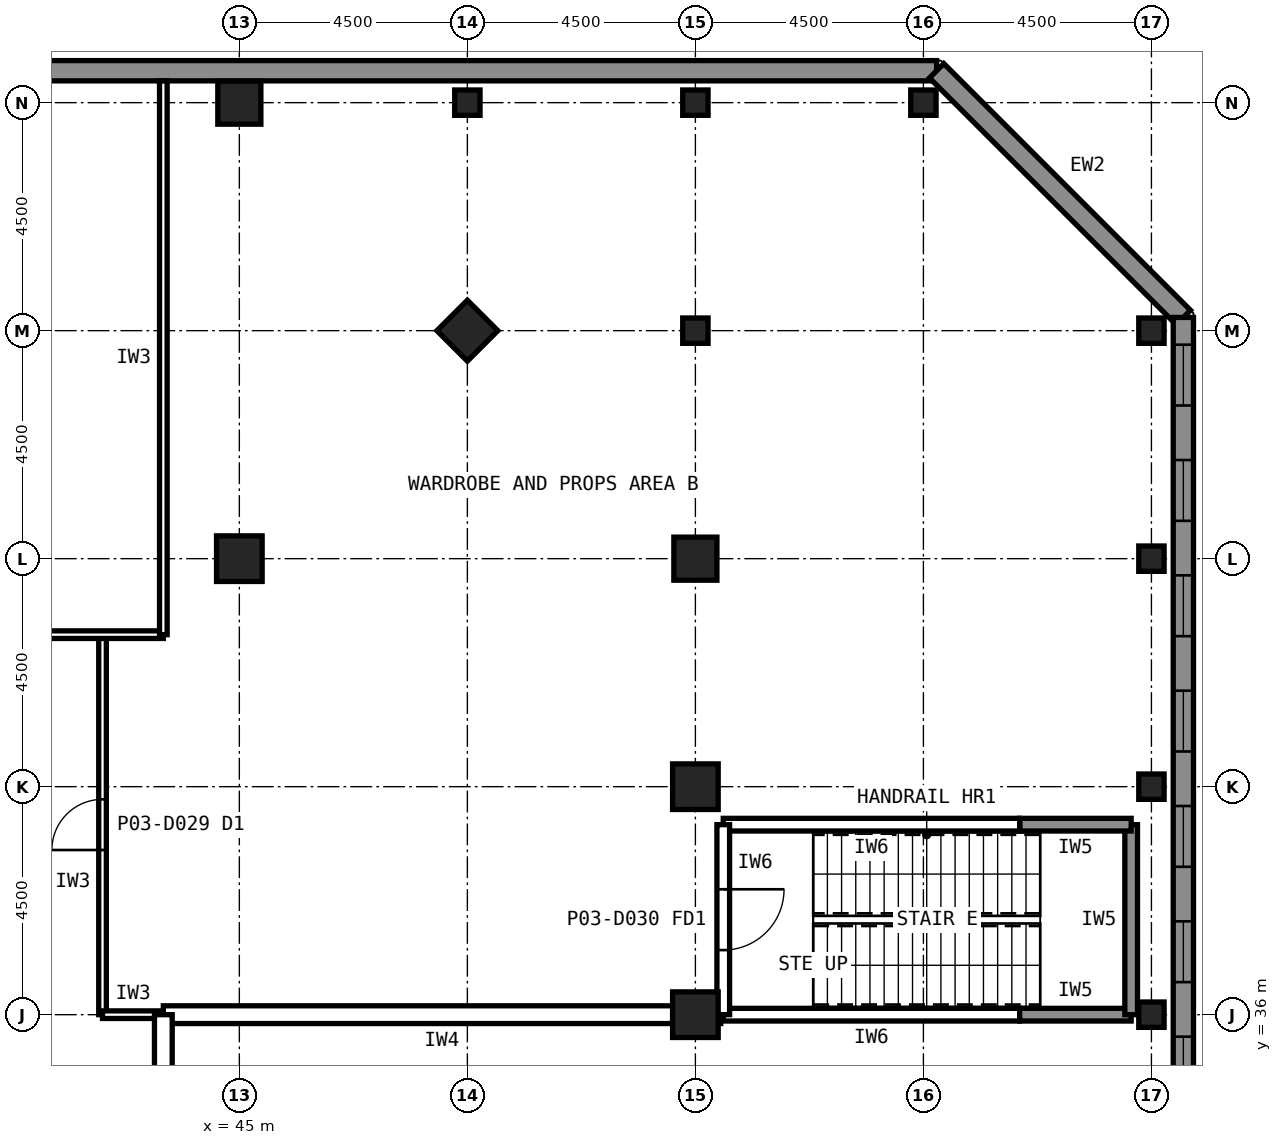
"""IFC4 building model, lengths in metres.
Left out: names, types, materials, properties, quantities, classifications, styles, units other than length and angle.
Written with IfcOpenShell. Run it as: python <this file> out.ifc"""

import sys

from ifc_helpers import new_model, si_unit, direction, frame, frame_2d, origin, origin_2d, place, context, subcontext, project, spatial, rectangle, hollow_rectangle, extrude, element, fill, save


model = new_model("IFC4")
c1 = context("Model", 3, precision=1e-05, world=origin(), true_north=direction((0.0, 1.0)))
c2 = subcontext(c1, "Body", "Model", "MODEL_VIEW")
j1 = project(units=[si_unit("LENGTHUNIT", "METRE"), si_unit("PLANEANGLEUNIT", "RADIAN")], contexts=[c1])
p1 = place(None, origin())
s1 = spatial("IfcSite", under=j1, at=p1, CompositionType="ELEMENT")
p2 = place(p1, origin())
s2 = spatial("IfcBuilding", under=s1, at=p2, CompositionType="ELEMENT")
p3 = place(p2, frame((0.0, 0.0, 12.0)))
s3 = spatial("IfcBuildingStorey", under=s2, at=p3, CompositionType="ELEMENT", Elevation=12.0)
for number, where, z_axis, x_axis in (
    (1, (54.0, 36.0, 0.0), (0.0, 0.0, 1.0), (1.0, 0.0, 0.0)),
    (2, (54.0, 40.5, 0.0), (0.0, 0.0, 1.0), (1.0, 0.0, 0.0)),
):
    element("IfcColumn", number, at=place(p3, frame(where, z_axis=z_axis, x_axis=x_axis)), inside=s3, PredefinedType="COLUMN", context=c2, shape_type="SweptSolid", body=[
        extrude(hollow_rectangle(XDim=0.9, YDim=0.9, WallThickness=0.063, at=origin_2d()), origin(), (0.0, 0.0, 1.0), 6.0),
    ])
for number, where, z_axis, x_axis in (
    (3, (54.0, 45.0, 0.0), (0.0, 0.0, 1.0), (1.0, 0.0, 0.0)),
    (4, (45.0, 54.0, 0.0), (0.0, 0.0, 1.0), (1.0, 0.0, 0.0)),
    (5, (49.5, 49.5, 0.0), (0.0, 0.0, 1.0), (0.707, 0.707, 0.0)),
):
    element("IfcColumn", number, at=place(p3, frame(where, z_axis=z_axis, x_axis=x_axis)), inside=s3, PredefinedType="COLUMN", context=c2, shape_type="SweptSolid", body=[
        extrude(hollow_rectangle(XDim=0.85, YDim=0.85, WallThickness=0.05, at=origin_2d()), origin(), (0.0, 0.0, 1.0), 6.0),
    ])
p4 = place(p3, frame((45.0, 45.0, 0.0), z_axis=(0.0, 0.0, 1.0), x_axis=(1.0, 0.0, 0.0)))
e6 = element("IfcColumn", 6, at=p4, inside=s3, PredefinedType="COLUMN", context=c2, shape_type="SweptSolid", body=[
    extrude(hollow_rectangle(XDim=0.9, YDim=0.9, WallThickness=0.063, at=origin_2d()), origin(), (0.0, 0.0, 1.0), 6.0),
])
for number, where, z_axis, x_axis in (
    (7, (63.0, 36.0, 0.0), (0.0, 0.0, 1.0), (1.0, 0.0, 0.0)),
    (8, (63.0, 40.5, 0.0), (0.0, 0.0, 1.0), (1.0, 0.0, 0.0)),
    (9, (63.0, 45.0, 0.0), (0.0, 0.0, 1.0), (1.0, 0.0, 0.0)),
    (10, (63.0, 49.5, 0.0), (0.0, 0.0, 1.0), (1.0, 0.0, 0.0)),
    (11, (58.5, 54.0, 0.0), (0.0, 0.0, 1.0), (1.0, 0.0, 0.0)),
    (12, (54.0, 54.0, 0.0), (0.0, 0.0, 1.0), (1.0, 0.0, 0.0)),
    (13, (49.5, 54.0, 0.0), (0.0, 0.0, 1.0), (1.0, 0.0, 0.0)),
    (14, (54.0, 49.5, 0.0), (0.0, 0.0, 1.0), (1.0, 0.0, 0.0)),
):
    element("IfcColumn", number, at=place(p3, frame(where, z_axis=z_axis, x_axis=x_axis)), inside=s3, PredefinedType="COLUMN", context=c2, shape_type="SweptSolid", body=[
        extrude(hollow_rectangle(XDim=0.5, YDim=0.5, WallThickness=0.022, at=origin_2d()), origin(), (0.0, 0.0, 1.0), 6.0),
    ])
p5 = place(p3, frame((-4.761, 54.63, 0.0), z_axis=(0.0, 0.0, 1.0), x_axis=(1.0, 0.0, 0.0)))
e15 = element("IfcWall", 15, at=p5, inside=s3, PredefinedType="SOLIDWALL", context=c2, shape_type="SweptSolid", body=[
    extrude(rectangle(XDim=63.522, YDim=0.4, at=frame_2d((31.761, 0.0))), origin(), (0.0, 0.0, 1.0), 6.0),
])
p6 = place(p3, frame((58.761, 54.63, 0.0), z_axis=(0.0, 0.0, 1.0), x_axis=(0.707106781187, -0.707106781187, 0.0)))
e16 = element("IfcWall", 16, at=p6, inside=s3, PredefinedType="SOLIDWALL", context=c2, shape_type="SweptSolid", body=[
    extrude(rectangle(XDim=6.886, YDim=0.4, at=frame_2d((3.443, 0.0))), origin(), (0.0, 0.0, 1.0), 6.0),
])
p7 = place(p3, frame((63.63, 49.761, 0.0), z_axis=(0.0, 0.0, 1.0), x_axis=(0.0, -1.0, 0.0)))
e17 = element("IfcWall", 17, at=p7, inside=s3, PredefinedType="SOLIDWALL", context=c2, shape_type="SweptSolid", body=[
    extrude(rectangle(XDim=45.522, YDim=0.4, at=frame_2d((22.761, 0.0))), origin(), (0.0, 0.0, 1.0), 6.0),
])
p8 = place(p7, frame((0.538, 0.0, 0.9)))
e18 = element("IfcOpeningElement", 18, at=p8, cuts=e17, PredefinedType="OPENING", context=c2, shape_type="SweptSolid", body=[
    extrude(rectangle(XDim=1.2, YDim=1.5, at=frame_2d((0.6, 0.75))), frame((0.0, 0.21, 0.0), z_axis=(0.0, -1.0, 0.0), x_axis=(1.0, 0.0, 0.0)), (0.0, 0.0, 1.0), 0.42),
])
p9 = place(p7, frame((2.814, 0.0, 0.9)))
e19 = element("IfcOpeningElement", 19, at=p9, cuts=e17, PredefinedType="OPENING", context=c2, shape_type="SweptSolid", body=[
    extrude(rectangle(XDim=1.2, YDim=1.5, at=frame_2d((0.6, 0.75))), frame((0.0, 0.21, 0.0), z_axis=(0.0, -1.0, 0.0), x_axis=(1.0, 0.0, 0.0)), (0.0, 0.0, 1.0), 0.42),
])
p10 = place(p7, frame((5.09, 0.0, 0.9)))
e20 = element("IfcOpeningElement", 20, at=p10, cuts=e17, PredefinedType="OPENING", context=c2, shape_type="SweptSolid", body=[
    extrude(rectangle(XDim=1.2, YDim=1.5, at=frame_2d((0.6, 0.75))), frame((0.0, 0.21, 0.0), z_axis=(0.0, -1.0, 0.0), x_axis=(1.0, 0.0, 0.0)), (0.0, 0.0, 1.0), 0.42),
])
p11 = place(p7, frame((7.366, 0.0, 0.9)))
e21 = element("IfcOpeningElement", 21, at=p11, cuts=e17, PredefinedType="OPENING", context=c2, shape_type="SweptSolid", body=[
    extrude(rectangle(XDim=1.2, YDim=1.5, at=frame_2d((0.6, 0.75))), frame((0.0, 0.21, 0.0), z_axis=(0.0, -1.0, 0.0), x_axis=(1.0, 0.0, 0.0)), (0.0, 0.0, 1.0), 0.42),
])
p12 = place(p7, frame((9.642, 0.0, 0.9)))
e22 = element("IfcOpeningElement", 22, at=p12, cuts=e17, PredefinedType="OPENING", context=c2, shape_type="SweptSolid", body=[
    extrude(rectangle(XDim=1.2, YDim=1.5, at=frame_2d((0.6, 0.75))), frame((0.0, 0.21, 0.0), z_axis=(0.0, -1.0, 0.0), x_axis=(1.0, 0.0, 0.0)), (0.0, 0.0, 1.0), 0.42),
])
p13 = place(p7, frame((11.918, 0.0, 0.9)))
e23 = element("IfcOpeningElement", 23, at=p13, cuts=e17, PredefinedType="OPENING", context=c2, shape_type="SweptSolid", body=[
    extrude(rectangle(XDim=1.2, YDim=1.5, at=frame_2d((0.6, 0.75))), frame((0.0, 0.21, 0.0), z_axis=(0.0, -1.0, 0.0), x_axis=(1.0, 0.0, 0.0)), (0.0, 0.0, 1.0), 0.42),
])
p14 = place(p7, frame((14.195, 0.0, 0.9)))
e24 = element("IfcOpeningElement", 24, at=p14, cuts=e17, PredefinedType="OPENING", context=c2, shape_type="SweptSolid", body=[
    extrude(rectangle(XDim=1.2, YDim=1.5, at=frame_2d((0.6, 0.75))), frame((0.0, 0.21, 0.0), z_axis=(0.0, -1.0, 0.0), x_axis=(1.0, 0.0, 0.0)), (0.0, 0.0, 1.0), 0.42),
])
p15 = place(p7, frame((16.471, 0.0, 0.9)))
e25 = element("IfcOpeningElement", 25, at=p15, cuts=e17, PredefinedType="OPENING", context=c2, shape_type="SweptSolid", body=[
    extrude(rectangle(XDim=1.2, YDim=1.5, at=frame_2d((0.6, 0.75))), frame((0.0, 0.21, 0.0), z_axis=(0.0, -1.0, 0.0), x_axis=(1.0, 0.0, 0.0)), (0.0, 0.0, 1.0), 0.42),
])
p16 = place(p7, frame((18.747, 0.0, 0.9)))
e26 = element("IfcOpeningElement", 26, at=p16, cuts=e17, PredefinedType="OPENING", context=c2, shape_type="SweptSolid", body=[
    extrude(rectangle(XDim=1.2, YDim=1.5, at=frame_2d((0.6, 0.75))), frame((0.0, 0.21, 0.0), z_axis=(0.0, -1.0, 0.0), x_axis=(1.0, 0.0, 0.0)), (0.0, 0.0, 1.0), 0.42),
])
p17 = place(p7, frame((21.023, 0.0, 0.9)))
e27 = element("IfcOpeningElement", 27, at=p17, cuts=e17, PredefinedType="OPENING", context=c2, shape_type="SweptSolid", body=[
    extrude(rectangle(XDim=1.2, YDim=1.5, at=frame_2d((0.6, 0.75))), frame((0.0, 0.21, 0.0), z_axis=(0.0, -1.0, 0.0), x_axis=(1.0, 0.0, 0.0)), (0.0, 0.0, 1.0), 0.42),
])
p18 = place(p7, frame((23.299, 0.0, 0.9)))
e28 = element("IfcOpeningElement", 28, at=p18, cuts=e17, PredefinedType="OPENING", context=c2, shape_type="SweptSolid", body=[
    extrude(rectangle(XDim=1.2, YDim=1.5, at=frame_2d((0.6, 0.75))), frame((0.0, 0.21, 0.0), z_axis=(0.0, -1.0, 0.0), x_axis=(1.0, 0.0, 0.0)), (0.0, 0.0, 1.0), 0.42),
])
p19 = place(p7, frame((25.575, 0.0, 0.9)))
e29 = element("IfcOpeningElement", 29, at=p19, cuts=e17, PredefinedType="OPENING", context=c2, shape_type="SweptSolid", body=[
    extrude(rectangle(XDim=1.2, YDim=1.5, at=frame_2d((0.6, 0.75))), frame((0.0, 0.21, 0.0), z_axis=(0.0, -1.0, 0.0), x_axis=(1.0, 0.0, 0.0)), (0.0, 0.0, 1.0), 0.42),
])
p20 = place(p7, frame((27.851, 0.0, 0.9)))
e30 = element("IfcOpeningElement", 30, at=p20, cuts=e17, PredefinedType="OPENING", context=c2, shape_type="SweptSolid", body=[
    extrude(rectangle(XDim=1.2, YDim=1.5, at=frame_2d((0.6, 0.75))), frame((0.0, 0.21, 0.0), z_axis=(0.0, -1.0, 0.0), x_axis=(1.0, 0.0, 0.0)), (0.0, 0.0, 1.0), 0.42),
])
p21 = place(p7, frame((30.127, 0.0, 0.9)))
e31 = element("IfcOpeningElement", 31, at=p21, cuts=e17, PredefinedType="OPENING", context=c2, shape_type="SweptSolid", body=[
    extrude(rectangle(XDim=1.2, YDim=1.5, at=frame_2d((0.6, 0.75))), frame((0.0, 0.21, 0.0), z_axis=(0.0, -1.0, 0.0), x_axis=(1.0, 0.0, 0.0)), (0.0, 0.0, 1.0), 0.42),
])
p22 = place(p7, frame((32.404, 0.0, 0.9)))
e32 = element("IfcOpeningElement", 32, at=p22, cuts=e17, PredefinedType="OPENING", context=c2, shape_type="SweptSolid", body=[
    extrude(rectangle(XDim=1.2, YDim=1.5, at=frame_2d((0.6, 0.75))), frame((0.0, 0.21, 0.0), z_axis=(0.0, -1.0, 0.0), x_axis=(1.0, 0.0, 0.0)), (0.0, 0.0, 1.0), 0.42),
])
p23 = place(p7, frame((34.679, 0.0, 0.9)))
e33 = element("IfcOpeningElement", 33, at=p23, cuts=e17, PredefinedType="OPENING", context=c2, shape_type="SweptSolid", body=[
    extrude(rectangle(XDim=1.2, YDim=1.5, at=frame_2d((0.6, 0.75))), frame((0.0, 0.21, 0.0), z_axis=(0.0, -1.0, 0.0), x_axis=(1.0, 0.0, 0.0)), (0.0, 0.0, 1.0), 0.42),
])
p24 = place(p7, frame((36.956, 0.0, 0.9)))
e34 = element("IfcOpeningElement", 34, at=p24, cuts=e17, PredefinedType="OPENING", context=c2, shape_type="SweptSolid", body=[
    extrude(rectangle(XDim=1.2, YDim=1.5, at=frame_2d((0.6, 0.75))), frame((0.0, 0.21, 0.0), z_axis=(0.0, -1.0, 0.0), x_axis=(1.0, 0.0, 0.0)), (0.0, 0.0, 1.0), 0.42),
])
p25 = place(p7, frame((39.232, 0.0, 0.9)))
e35 = element("IfcOpeningElement", 35, at=p25, cuts=e17, PredefinedType="OPENING", context=c2, shape_type="SweptSolid", body=[
    extrude(rectangle(XDim=1.2, YDim=1.5, at=frame_2d((0.6, 0.75))), frame((0.0, 0.21, 0.0), z_axis=(0.0, -1.0, 0.0), x_axis=(1.0, 0.0, 0.0)), (0.0, 0.0, 1.0), 0.42),
])
p26 = place(p7, frame((41.508, 0.0, 0.9)))
e36 = element("IfcOpeningElement", 36, at=p26, cuts=e17, PredefinedType="OPENING", context=c2, shape_type="SweptSolid", body=[
    extrude(rectangle(XDim=1.2, YDim=1.5, at=frame_2d((0.6, 0.75))), frame((0.0, 0.21, 0.0), z_axis=(0.0, -1.0, 0.0), x_axis=(1.0, 0.0, 0.0)), (0.0, 0.0, 1.0), 0.42),
])
p27 = place(p7, frame((43.784, 0.0, 0.9)))
e37 = element("IfcOpeningElement", 37, at=p27, cuts=e17, PredefinedType="OPENING", context=c2, shape_type="SweptSolid", body=[
    extrude(rectangle(XDim=1.2, YDim=1.5, at=frame_2d((0.6, 0.75))), frame((0.0, 0.21, 0.0), z_axis=(0.0, -1.0, 0.0), x_axis=(1.0, 0.0, 0.0)), (0.0, 0.0, 1.0), 0.42),
])
p28 = place(p3, frame((42.3, 36.0, 0.0), z_axis=(0.0, 0.0, 1.0), x_axis=(0.0, 1.0, 0.0)))
e38 = element("IfcWall", 38, at=p28, inside=s3, PredefinedType="PARTITIONING", context=c2, shape_type="SweptSolid", body=[
    extrude(rectangle(XDim=7.5, YDim=0.15, at=frame_2d((3.75, 0.0))), origin(), (0.0, 0.0, 1.0), 5.8),
])
p29 = place(p28, frame((3.25, 0.0, 0.0)))
e39 = element("IfcOpeningElement", 39, at=p29, cuts=e38, PredefinedType="OPENING", context=c2, shape_type="SweptSolid", body=[
    extrude(rectangle(XDim=1.0, YDim=2.1, at=frame_2d((0.5, 1.05))), frame((0.0, 0.085, 0.0), z_axis=(0.0, -1.0, 0.0), x_axis=(1.0, 0.0, 0.0)), (0.0, 0.0, 1.0), 0.17),
])
p30 = place(p3, frame((43.51, 36.0, 0.0), z_axis=(0.0, 0.0, 1.0), x_axis=(-1.0, 0.0, 0.0)))
e40 = element("IfcWall", 40, at=p30, inside=s3, PredefinedType="PARTITIONING", context=c2, shape_type="SweptSolid", body=[
    extrude(rectangle(XDim=1.21, YDim=0.15, at=frame_2d((0.605, 0.0))), origin(), (0.0, 0.0, 1.0), 4.949),
])
p31 = place(p3, frame((54.5, 36.0, 0.0), z_axis=(0.0, 0.0, 1.0), x_axis=(-1.0, 0.0, 0.0)))
e41 = element("IfcWall", 41, at=p31, inside=s3, PredefinedType="PARTITIONING", context=c2, shape_type="SweptSolid", body=[
    extrude(rectangle(XDim=11.0, YDim=0.35, at=frame_2d((5.5, 0.0))), origin(), (0.0, 0.0, 1.0), 4.949),
])
p32 = place(p3, frame((43.5, 36.0, 0.0), z_axis=(0.0, 0.0, 1.0), x_axis=(0.0, -1.0, 0.0)))
e42 = element("IfcWall", 42, at=p32, inside=s3, PredefinedType="PARTITIONING", context=c2, shape_type="SweptSolid", body=[
    extrude(rectangle(XDim=18.0, YDim=0.35, at=frame_2d((9.0, 0.0))), origin(), (0.0, 0.0, 1.0), 5.8),
])
p33 = place(p32, frame((7.8, 0.0, 0.0)))
e43 = element("IfcOpeningElement", 43, at=p33, cuts=e42, PredefinedType="OPENING", context=c2, shape_type="SweptSolid", body=[
    extrude(rectangle(XDim=2.4, YDim=3.0, at=frame_2d((1.2, 1.5))), frame((0.0, 0.185, 0.0), z_axis=(0.0, -1.0, 0.0), x_axis=(1.0, 0.0, 0.0)), (0.0, 0.0, 1.0), 0.37),
])
p34 = place(p3, frame((10.5, 43.5, 0.0), z_axis=(0.0, 0.0, 1.0), x_axis=(1.0, 0.0, 0.0)))
e44 = element("IfcWall", 44, at=p34, inside=s3, PredefinedType="PARTITIONING", context=c2, shape_type="SweptSolid", body=[
    extrude(rectangle(XDim=33.0, YDim=0.15, at=frame_2d((16.5, 0.0))), origin(), (0.0, 0.0, 1.0), 5.8),
])
p35 = place(p34, frame((16.0, 0.0, 0.0)))
e45 = element("IfcOpeningElement", 45, at=p35, cuts=e44, PredefinedType="OPENING", context=c2, shape_type="SweptSolid", body=[
    extrude(rectangle(XDim=1.0, YDim=2.1, at=frame_2d((0.5, 1.05))), frame((0.0, 0.085, 0.0), z_axis=(0.0, -1.0, 0.0), x_axis=(1.0, 0.0, 0.0)), (0.0, 0.0, 1.0), 0.17),
])
p36 = place(p3, frame((43.5, 43.5, 0.0), z_axis=(0.0, 0.0, 1.0), x_axis=(0.0, 1.0, 0.0)))
e46 = element("IfcWall", 46, at=p36, inside=s3, PredefinedType="PARTITIONING", context=c2, shape_type="SweptSolid", body=[
    extrude(rectangle(XDim=10.93, YDim=0.15, at=frame_2d((5.465, 0.0))), origin(), (0.0, 0.0, 1.0), 5.8),
])
p37 = place(p3, frame((54.55, 36.0, 0.0), z_axis=(0.0, 0.0, 1.0), x_axis=(1.0, 0.0, 0.0)))
e47 = element("IfcWall", 47, at=p37, inside=s3, PredefinedType="PARTITIONING", context=c2, shape_type="SweptSolid", body=[
    extrude(rectangle(XDim=5.85, YDim=0.25, at=frame_2d((2.925, 0.0))), origin(), (0.0, 0.0, 1.0), 5.189),
])
p38 = place(p3, frame((60.4, 36.0, 0.0), z_axis=(0.0, 0.0, 1.0), x_axis=(1.0, 0.0, 0.0)))
e48 = element("IfcWall", 48, at=p38, inside=s3, PredefinedType="SOLIDWALL", context=c2, shape_type="SweptSolid", body=[
    extrude(rectangle(XDim=2.2, YDim=0.25, at=frame_2d((1.1, 0.0))), origin(), (0.0, 0.0, 1.0), 5.189),
])
p39 = place(p3, frame((62.6, 36.0, 0.0), z_axis=(0.0, 0.0, 1.0), x_axis=(0.0, 1.0, 0.0)))
e49 = element("IfcWall", 49, at=p39, inside=s3, PredefinedType="SOLIDWALL", context=c2, shape_type="SweptSolid", body=[
    extrude(rectangle(XDim=3.75, YDim=0.25, at=frame_2d((1.875, 0.0))), origin(), (0.0, 0.0, 1.0), 6.0),
])
p40 = place(p3, frame((62.6, 39.75, 0.0), z_axis=(0.0, 0.0, 1.0), x_axis=(-1.0, 0.0, 0.0)))
e50 = element("IfcWall", 50, at=p40, inside=s3, PredefinedType="SOLIDWALL", context=c2, shape_type="SweptSolid", body=[
    extrude(rectangle(XDim=2.2, YDim=0.25, at=frame_2d((1.1, 0.0))), origin(), (0.0, 0.0, 1.0), 6.0),
])
p41 = place(p3, frame((60.4, 39.75, 0.0), z_axis=(0.0, 0.0, 1.0), x_axis=(-1.0, 0.0, 0.0)))
e51 = element("IfcWall", 51, at=p41, inside=s3, PredefinedType="PARTITIONING", context=c2, shape_type="SweptSolid", body=[
    extrude(rectangle(XDim=5.85, YDim=0.25, at=frame_2d((2.925, 0.0))), origin(), (0.0, 0.0, 1.0), 5.8),
])
p42 = place(p3, frame((54.55, 39.75, 0.0), z_axis=(0.0, 0.0, 1.0), x_axis=(0.0, -1.0, 0.0)))
e52 = element("IfcWall", 52, at=p42, inside=s3, PredefinedType="PARTITIONING", context=c2, shape_type="SweptSolid", body=[
    extrude(rectangle(XDim=3.75, YDim=0.25, at=frame_2d((1.875, 0.0))), origin(), (0.0, 0.0, 1.0), 5.8),
])
p43 = place(p42, frame((1.275, 0.0, 0.0)))
e53 = element("IfcOpeningElement", 53, at=p43, cuts=e52, PredefinedType="OPENING", context=c2, shape_type="SweptSolid", body=[
    extrude(rectangle(XDim=1.2, YDim=2.1, at=frame_2d((0.6, 1.05))), frame((0.0, 0.135, 0.0), z_axis=(0.0, -1.0, 0.0), x_axis=(1.0, 0.0, 0.0)), (0.0, 0.0, 1.0), 0.27),
])
p44 = place(p8, origin())
e54 = element("IfcWindow", 54, at=p44, inside=s3, PartitioningType="SINGLE_PANEL", PredefinedType="WINDOW", context=c2, shape_type="SweptSolid", body=[
    extrude(rectangle(XDim=1.2, YDim=1.5, at=frame_2d((0.6, 0.75))), frame((0.0, 0.03, 0.0), z_axis=(0.0, -1.0, 0.0), x_axis=(1.0, 0.0, 0.0)), (0.0, 0.0, 1.0), 0.06),
])
fill(e18, e54)
p45 = place(p9, origin())
e55 = element("IfcWindow", 55, at=p45, inside=s3, PartitioningType="SINGLE_PANEL", PredefinedType="WINDOW", context=c2, shape_type="SweptSolid", body=[
    extrude(rectangle(XDim=1.2, YDim=1.5, at=frame_2d((0.6, 0.75))), frame((0.0, 0.03, 0.0), z_axis=(0.0, -1.0, 0.0), x_axis=(1.0, 0.0, 0.0)), (0.0, 0.0, 1.0), 0.06),
])
fill(e19, e55)
p46 = place(p10, origin())
e56 = element("IfcWindow", 56, at=p46, inside=s3, PartitioningType="SINGLE_PANEL", PredefinedType="WINDOW", context=c2, shape_type="SweptSolid", body=[
    extrude(rectangle(XDim=1.2, YDim=1.5, at=frame_2d((0.6, 0.75))), frame((0.0, 0.03, 0.0), z_axis=(0.0, -1.0, 0.0), x_axis=(1.0, 0.0, 0.0)), (0.0, 0.0, 1.0), 0.06),
])
fill(e20, e56)
p47 = place(p11, origin())
e57 = element("IfcWindow", 57, at=p47, inside=s3, PartitioningType="SINGLE_PANEL", PredefinedType="WINDOW", context=c2, shape_type="SweptSolid", body=[
    extrude(rectangle(XDim=1.2, YDim=1.5, at=frame_2d((0.6, 0.75))), frame((0.0, 0.03, 0.0), z_axis=(0.0, -1.0, 0.0), x_axis=(1.0, 0.0, 0.0)), (0.0, 0.0, 1.0), 0.06),
])
fill(e21, e57)
p48 = place(p12, origin())
e58 = element("IfcWindow", 58, at=p48, inside=s3, PartitioningType="SINGLE_PANEL", PredefinedType="WINDOW", context=c2, shape_type="SweptSolid", body=[
    extrude(rectangle(XDim=1.2, YDim=1.5, at=frame_2d((0.6, 0.75))), frame((0.0, 0.03, 0.0), z_axis=(0.0, -1.0, 0.0), x_axis=(1.0, 0.0, 0.0)), (0.0, 0.0, 1.0), 0.06),
])
fill(e22, e58)
p49 = place(p13, origin())
e59 = element("IfcWindow", 59, at=p49, inside=s3, PartitioningType="SINGLE_PANEL", PredefinedType="WINDOW", context=c2, shape_type="SweptSolid", body=[
    extrude(rectangle(XDim=1.2, YDim=1.5, at=frame_2d((0.6, 0.75))), frame((0.0, 0.03, 0.0), z_axis=(0.0, -1.0, 0.0), x_axis=(1.0, 0.0, 0.0)), (0.0, 0.0, 1.0), 0.06),
])
fill(e23, e59)
p50 = place(p14, origin())
e60 = element("IfcWindow", 60, at=p50, inside=s3, PartitioningType="SINGLE_PANEL", PredefinedType="WINDOW", context=c2, shape_type="SweptSolid", body=[
    extrude(rectangle(XDim=1.2, YDim=1.5, at=frame_2d((0.6, 0.75))), frame((0.0, 0.03, 0.0), z_axis=(0.0, -1.0, 0.0), x_axis=(1.0, 0.0, 0.0)), (0.0, 0.0, 1.0), 0.06),
])
fill(e24, e60)
p51 = place(p29, origin())
e61 = element("IfcDoor", 61, at=p51, inside=s3, OperationType="SINGLE_SWING_LEFT", PredefinedType="DOOR", context=c2, shape_type="SweptSolid", body=[
    extrude(rectangle(XDim=1.0, YDim=2.1, at=frame_2d((0.5, 1.05))), frame((0.0, 0.025, 0.0), z_axis=(0.0, -1.0, 0.0), x_axis=(1.0, 0.0, 0.0)), (0.0, 0.0, 1.0), 0.05),
])
fill(e39, e61)
p52 = place(p43, origin())
e62 = element("IfcDoor", 62, at=p52, inside=s3, OperationType="SINGLE_SWING_LEFT", PredefinedType="DOOR", context=c2, shape_type="SweptSolid", body=[
    extrude(rectangle(XDim=1.2, YDim=2.1, at=frame_2d((0.6, 1.05))), frame((0.0, 0.025, 0.0), z_axis=(0.0, -1.0, 0.0), x_axis=(1.0, 0.0, 0.0)), (0.0, 0.0, 1.0), 0.05),
])
fill(e53, e62)
save(model, sys.argv[1])
